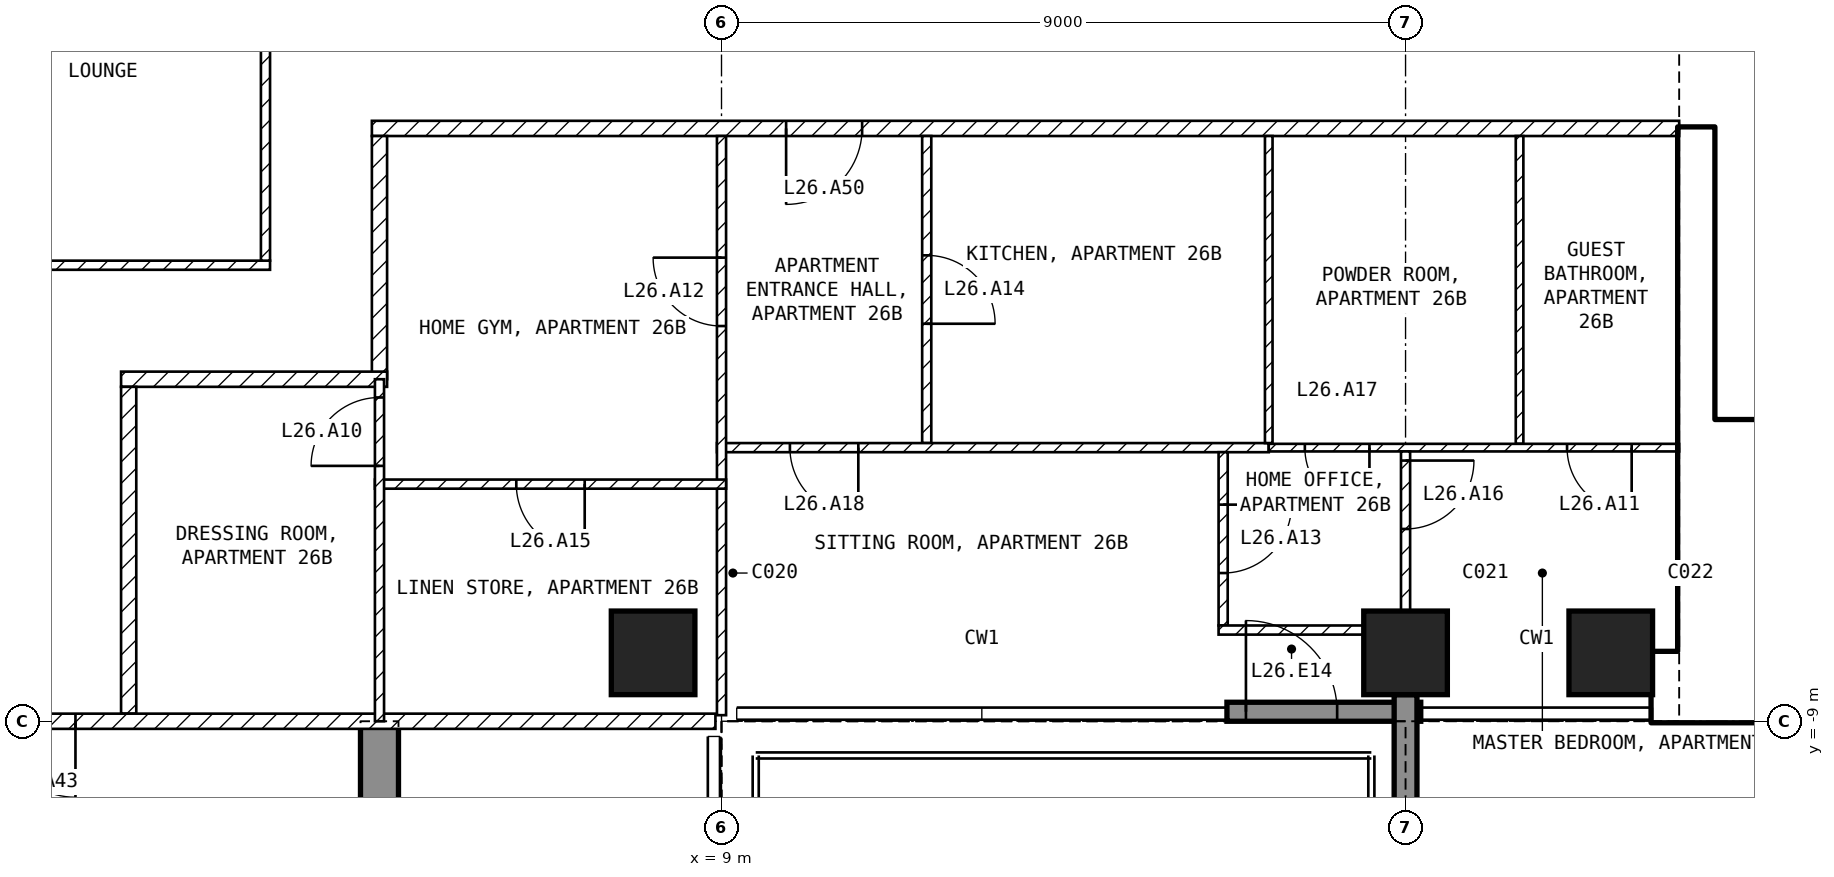
"""IFC4 building model, lengths in metres.
Left out: names, types, materials, properties, quantities, classifications, styles, units other than length and angle.
Written with IfcOpenShell. Run it as: python <this file> out.ifc"""

import sys

from ifc_helpers import new_model, si_unit, direction, frame, frame_2d, origin, origin_2d, place, context, subcontext, project, spatial, polyline, rectangle, outline, extrude, element, fill, save


model = new_model("IFC4")
c1 = context("Model", 3, precision=1e-05, world=origin(), true_north=direction((0.0, 1.0)))
c2 = subcontext(c1, "Body", "Model", "MODEL_VIEW")
j1 = project(units=[si_unit("LENGTHUNIT", "METRE"), si_unit("PLANEANGLEUNIT", "RADIAN")], contexts=[c1])
p1 = place(None, origin())
s1 = spatial("IfcSite", under=j1, at=p1, CompositionType="ELEMENT")
p2 = place(p1, origin())
s2 = spatial("IfcBuilding", under=s1, at=p2, CompositionType="ELEMENT")
p3 = place(p2, frame((0.0, 0.0, 112.9)))
s3 = spatial("IfcBuildingStorey", under=s2, at=p3, CompositionType="ELEMENT", Elevation=112.9)
for number, where, z_axis, x_axis in (
    (1, (8.1, -8.1, -0.25), (0.0, 0.0, 1.0), (1.0, 0.0, 0.0)),
    (2, (18.0, -8.1, -0.25), (0.0, 0.0, 1.0), (1.0, 0.0, 0.0)),
    (3, (20.7, -8.1, -0.25), (0.0, 0.0, 1.0), (1.0, 0.0, 0.0)),
):
    element("IfcColumn", number, at=place(p3, frame(where, z_axis=z_axis, x_axis=x_axis)), inside=s3, PredefinedType="COLUMN", context=c2, shape_type="SweptSolid", body=[
        extrude(rectangle(XDim=1.1, YDim=1.1, at=origin_2d()), origin(), (0.0, 0.0, 1.0), 3.5),
    ])
p4 = place(p3, frame((4.25, -20.15, -0.25), z_axis=(1.0, 0.0, 0.0), x_axis=(0.0, 1.0, 0.0)))
e4 = element("IfcWall", 4, at=p4, inside=s3, PredefinedType="SHEAR", context=c2, shape_type="SweptSolid", body=[
    extrude(outline(polyline([(0.0, 0.0), (6.65, 0.0), (6.65, 2.65), (9.05, 2.65), (9.05, 0.0), (11.15, 0.0), (11.15, 3.5), (0.0, 3.5), (0.0, 0.0)])), origin(), (0.0, 0.0, 1.0), 0.5),
])
p5 = place(p3, frame((15.65, -8.875, 0.0), z_axis=(0.0, 0.0, 1.0), x_axis=(1.0, 0.0, 0.0)))
e5 = element("IfcWall", 5, at=p5, inside=s3, PredefinedType="SOLIDWALL", context=c2, shape_type="SweptSolid", body=[
    extrude(rectangle(XDim=2.55, YDim=0.25, at=frame_2d((1.275, 0.0))), origin(), (0.0, 0.0, 1.0), 3.25),
])
p6 = place(p5, frame((0.25, 0.0, 0.0)))
e6 = element("IfcOpeningElement", 6, at=p6, cuts=e5, PredefinedType="OPENING", context=c2, shape_type="SweptSolid", body=[
    extrude(rectangle(XDim=1.2, YDim=2.4, at=frame_2d((0.6, 1.2))), frame((0.0, 0.135, 0.0), z_axis=(0.0, -1.0, 0.0), x_axis=(1.0, 0.0, 0.0)), (0.0, 0.0, 1.0), 0.27),
])
p7 = place(p3, frame((18.0, -8.65, 0.0), z_axis=(0.0, 0.0, 1.0), x_axis=(0.0, -1.0, 0.0)))
e7 = element("IfcWall", 7, at=p7, inside=s3, PredefinedType="SOLIDWALL", context=c2, shape_type="SweptSolid", body=[
    extrude(rectangle(XDim=3.09, YDim=0.3, at=frame_2d((1.545, 0.0))), origin(), (0.0, 0.0, 1.0), 3.25),
])
p8 = place(p3, frame((21.25, -8.55, 0.0), z_axis=(0.0, 0.0, 1.0), x_axis=(1.0, 0.0, 0.0)))
e8 = element("IfcWall", 8, at=p8, inside=s3, PredefinedType="SHEAR", context=c2, shape_type="SweptSolid", body=[
    extrude(rectangle(XDim=8.95, YDim=0.9, at=frame_2d((4.475, 0.0))), origin(), (0.0, 0.0, 1.0), 3.25),
])
p9 = place(p3, frame((21.825, -8.1, 0.0), z_axis=(0.0, 0.0, 1.0), x_axis=(0.0, 1.0, 0.0)))
e9 = element("IfcWall", 9, at=p9, inside=s3, PredefinedType="SHEAR", context=c2, shape_type="SweptSolid", body=[
    extrude(rectangle(XDim=6.9, YDim=0.45, at=frame_2d((3.45, 0.0))), origin(), (0.0, 0.0, 1.0), 3.25),
])
p10 = place(p3, frame((22.05, -5.15, 0.0), z_axis=(0.0, 0.0, 1.0), x_axis=(1.0, 0.0, 0.0)))
e10 = element("IfcWall", 10, at=p10, inside=s3, PredefinedType="SOLIDWALL", context=c2, shape_type="SweptSolid", body=[
    extrude(rectangle(XDim=6.3, YDim=0.2, at=frame_2d((3.15, 0.0))), origin(), (0.0, 0.0, 1.0), 3.25),
])
p11 = place(p10, frame((0.2, 0.0, 0.0)))
e11 = element("IfcOpeningElement", 11, at=p11, cuts=e10, PredefinedType="OPENING", context=c2, shape_type="SweptSolid", body=[
    extrude(rectangle(XDim=1.0, YDim=2.1, at=frame_2d((0.5, 1.05))), frame((0.0, 0.11, 0.0), z_axis=(0.0, -1.0, 0.0), x_axis=(1.0, 0.0, 0.0)), (0.0, 0.0, 1.0), 0.22),
])
p12 = place(p3, frame((-3.06, -3.0, 0.0), z_axis=(0.0, 0.0, 1.0), x_axis=(1.0, 0.0, 0.0)))
e12 = element("IfcWall", 12, at=p12, inside=s3, PredefinedType="PARTITIONING", context=c2, shape_type="SweptSolid", body=[
    extrude(rectangle(XDim=6.12, YDim=0.12, at=frame_2d((3.06, 0.0))), origin(), (0.0, 0.0, 1.0), 3.25),
])
p13 = place(p3, frame((3.0, -2.94, 0.0), z_axis=(0.0, 0.0, 1.0), x_axis=(0.0, 1.0, 0.0)))
e13 = element("IfcWall", 13, at=p13, inside=s3, PredefinedType="PARTITIONING", context=c2, shape_type="SweptSolid", body=[
    extrude(rectangle(XDim=5.88, YDim=0.12, at=frame_2d((2.94, 0.0))), origin(), (0.0, 0.0, 1.0), 3.25),
])
p14 = place(p3, frame((21.6, -1.2, 0.0), z_axis=(0.0, 0.0, 1.0), x_axis=(-1.0, 0.0, 0.0)))
e14 = element("IfcWall", 14, at=p14, inside=s3, PredefinedType="PARTITIONING", context=c2, shape_type="SweptSolid", body=[
    extrude(rectangle(XDim=17.2, YDim=0.2, at=frame_2d((8.6, 0.0))), origin(), (0.0, 0.0, 1.0), 3.25),
])
p15 = place(p14, frame((10.75, 0.0, 0.0)))
e15 = element("IfcOpeningElement", 15, at=p15, cuts=e14, PredefinedType="OPENING", context=c2, shape_type="SweptSolid", body=[
    extrude(rectangle(XDim=1.0, YDim=2.1, at=frame_2d((0.5, 1.05))), frame((0.0, 0.11, 0.0), z_axis=(0.0, -1.0, 0.0), x_axis=(1.0, 0.0, 0.0)), (0.0, 0.0, 1.0), 0.22),
])
p16 = place(p3, frame((4.5, -1.3, 0.0), z_axis=(0.0, 0.0, 1.0), x_axis=(0.0, -1.0, 0.0)))
e16 = element("IfcWall", 16, at=p16, inside=s3, PredefinedType="PARTITIONING", context=c2, shape_type="SweptSolid", body=[
    extrude(rectangle(XDim=3.2, YDim=0.2, at=frame_2d((1.6, 0.0))), origin(), (0.0, 0.0, 1.0), 3.25),
])
p17 = place(p3, frame((4.6, -4.5, 0.0), z_axis=(0.0, 0.0, 1.0), x_axis=(-1.0, 0.0, 0.0)))
e17 = element("IfcWall", 17, at=p17, inside=s3, PredefinedType="PARTITIONING", context=c2, shape_type="SweptSolid", body=[
    extrude(rectangle(XDim=3.5, YDim=0.2, at=frame_2d((1.75, 0.0))), origin(), (0.0, 0.0, 1.0), 3.25),
])
p18 = place(p3, frame((1.2, -4.6, 0.0), z_axis=(0.0, 0.0, 1.0), x_axis=(0.0, -1.0, 0.0)))
e18 = element("IfcWall", 18, at=p18, inside=s3, PredefinedType="PARTITIONING", context=c2, shape_type="SweptSolid", body=[
    extrude(rectangle(XDim=4.3, YDim=0.2, at=frame_2d((2.15, 0.0))), origin(), (0.0, 0.0, 1.0), 3.25),
])
p19 = place(p3, frame((8.92, -9.0, 0.0), z_axis=(0.0, 0.0, 1.0), x_axis=(-1.0, 0.0, 0.0)))
e19 = element("IfcWall", 19, at=p19, inside=s3, PredefinedType="PARTITIONING", context=c2, shape_type="SweptSolid", body=[
    extrude(rectangle(XDim=17.84, YDim=0.2, at=frame_2d((8.92, 0.0))), origin(), (0.0, 0.0, 1.0), 3.25),
])
p20 = place(p19, frame((8.42, 0.0, 0.0)))
e20 = element("IfcOpeningElement", 20, at=p20, cuts=e19, PredefinedType="OPENING", context=c2, shape_type="SweptSolid", body=[
    extrude(rectangle(XDim=1.0, YDim=2.1, at=frame_2d((0.5, 1.05))), frame((0.0, 0.11, 0.0), z_axis=(0.0, -1.0, 0.0), x_axis=(1.0, 0.0, 0.0)), (0.0, 0.0, 1.0), 0.22),
])
p21 = place(p3, frame((11.7, -1.3, 0.0), z_axis=(0.0, 0.0, 1.0), x_axis=(0.0, -1.0, 0.0)))
e21 = element("IfcWall", 21, at=p21, inside=s3, PredefinedType="PARTITIONING", context=c2, shape_type="SweptSolid", body=[
    extrude(rectangle(XDim=4.04, YDim=0.12, at=frame_2d((2.02, 0.0))), origin(), (0.0, 0.0, 1.0), 3.25),
])
p22 = place(p21, frame((1.57, 0.0, 0.0)))
e22 = element("IfcOpeningElement", 22, at=p22, cuts=e21, PredefinedType="OPENING", context=c2, shape_type="SweptSolid", body=[
    extrude(rectangle(XDim=0.9, YDim=2.1, at=frame_2d((0.45, 1.05))), frame((0.0, 0.07, 0.0), z_axis=(0.0, -1.0, 0.0), x_axis=(1.0, 0.0, 0.0)), (0.0, 0.0, 1.0), 0.14),
])
p23 = place(p3, frame((16.2, -5.4, 0.0), z_axis=(0.0, 0.0, 1.0), x_axis=(-1.0, 0.0, 0.0)))
e23 = element("IfcWall", 23, at=p23, inside=s3, PredefinedType="PARTITIONING", context=c2, shape_type="SweptSolid", body=[
    extrude(rectangle(XDim=7.26, YDim=0.12, at=frame_2d((3.63, 0.0))), origin(), (0.0, 0.0, 1.0), 3.25),
])
p24 = place(p23, frame((5.4, 0.0, 0.0)))
e24 = element("IfcOpeningElement", 24, at=p24, cuts=e23, PredefinedType="OPENING", context=c2, shape_type="SweptSolid", body=[
    extrude(rectangle(XDim=0.9, YDim=2.1, at=frame_2d((0.45, 1.05))), frame((0.0, 0.07, 0.0), z_axis=(0.0, -1.0, 0.0), x_axis=(1.0, 0.0, 0.0)), (0.0, 0.0, 1.0), 0.14),
])
p25 = place(p3, frame((9.0, -8.92, 0.0), z_axis=(0.0, 0.0, 1.0), x_axis=(0.0, 1.0, 0.0)))
e25 = element("IfcWall", 25, at=p25, inside=s3, PredefinedType="PARTITIONING", context=c2, shape_type="SweptSolid", body=[
    extrude(rectangle(XDim=7.62, YDim=0.12, at=frame_2d((3.81, 0.0))), origin(), (0.0, 0.0, 1.0), 3.25),
])
p26 = place(p25, frame((5.12, 0.0, 0.0)))
e26 = element("IfcOpeningElement", 26, at=p26, cuts=e25, PredefinedType="OPENING", context=c2, shape_type="SweptSolid", body=[
    extrude(rectangle(XDim=0.9, YDim=2.1, at=frame_2d((0.45, 1.05))), frame((0.0, 0.07, 0.0), z_axis=(0.0, -1.0, 0.0), x_axis=(1.0, 0.0, 0.0)), (0.0, 0.0, 1.0), 0.14),
])
p27 = place(p3, frame((16.2, -1.3, 0.0), z_axis=(0.0, 0.0, 1.0), x_axis=(0.0, -1.0, 0.0)))
e27 = element("IfcWall", 27, at=p27, inside=s3, PredefinedType="PARTITIONING", context=c2, shape_type="SweptSolid", body=[
    extrude(rectangle(XDim=4.04, YDim=0.1, at=frame_2d((2.02, 0.0))), origin(), (0.0, 0.0, 1.0), 3.25),
])
p28 = place(p3, frame((19.5, -1.3, 0.0), z_axis=(0.0, 0.0, 1.0), x_axis=(0.0, -1.0, 0.0)))
e28 = element("IfcWall", 28, at=p28, inside=s3, PredefinedType="PARTITIONING", context=c2, shape_type="SweptSolid", body=[
    extrude(rectangle(XDim=4.05, YDim=0.1, at=frame_2d((2.025, 0.0))), origin(), (0.0, 0.0, 1.0), 3.25),
])
p29 = place(p3, frame((21.6, -5.4, 0.0), z_axis=(0.0, 0.0, 1.0), x_axis=(-1.0, 0.0, 0.0)))
e29 = element("IfcWall", 29, at=p29, inside=s3, PredefinedType="PARTITIONING", context=c2, shape_type="SweptSolid", body=[
    extrude(rectangle(XDim=5.4, YDim=0.1, at=frame_2d((2.7, 0.0))), origin(), (0.0, 0.0, 1.0), 3.25),
])
p30 = place(p29, frame((0.625, 0.0, 0.0)))
e30 = element("IfcOpeningElement", 30, at=p30, cuts=e29, PredefinedType="OPENING", context=c2, shape_type="SweptSolid", body=[
    extrude(rectangle(XDim=0.85, YDim=2.1, at=frame_2d((0.425, 1.05))), frame((0.0, 0.06, 0.0), z_axis=(0.0, -1.0, 0.0), x_axis=(1.0, 0.0, 0.0)), (0.0, 0.0, 1.0), 0.12),
])
p31 = place(p29, frame((4.075, 0.0, 0.0)))
e31 = element("IfcOpeningElement", 31, at=p31, cuts=e29, PredefinedType="OPENING", context=c2, shape_type="SweptSolid", body=[
    extrude(rectangle(XDim=0.85, YDim=2.1, at=frame_2d((0.425, 1.05))), frame((0.0, 0.06, 0.0), z_axis=(0.0, -1.0, 0.0), x_axis=(1.0, 0.0, 0.0)), (0.0, 0.0, 1.0), 0.12),
])
p32 = place(p3, frame((15.6, -5.46, 0.0), z_axis=(0.0, 0.0, 1.0), x_axis=(0.0, -1.0, 0.0)))
e32 = element("IfcWall", 32, at=p32, inside=s3, PredefinedType="PARTITIONING", context=c2, shape_type="SweptSolid", body=[
    extrude(rectangle(XDim=2.28, YDim=0.12, at=frame_2d((1.14, 0.0))), origin(), (0.0, 0.0, 1.0), 3.25),
])
p33 = place(p32, frame((0.69, 0.0, 0.0)))
e33 = element("IfcOpeningElement", 33, at=p33, cuts=e32, PredefinedType="OPENING", context=c2, shape_type="SweptSolid", body=[
    extrude(rectangle(XDim=0.9, YDim=2.1, at=frame_2d((0.45, 1.05))), frame((0.0, 0.07, 0.0), z_axis=(0.0, -1.0, 0.0), x_axis=(1.0, 0.0, 0.0)), (0.0, 0.0, 1.0), 0.14),
])
p34 = place(p3, frame((15.54, -7.8, 0.0), z_axis=(0.0, 0.0, 1.0), x_axis=(1.0, 0.0, 0.0)))
e34 = element("IfcWall", 34, at=p34, inside=s3, PredefinedType="PARTITIONING", context=c2, shape_type="SweptSolid", body=[
    extrude(rectangle(XDim=1.91, YDim=0.12, at=frame_2d((0.955, 0.0))), origin(), (0.0, 0.0, 1.0), 3.25),
])
p35 = place(p3, frame((18.0, -5.45, 0.0), z_axis=(0.0, 0.0, 1.0), x_axis=(0.0, -1.0, 0.0)))
e35 = element("IfcWall", 35, at=p35, inside=s3, PredefinedType="PARTITIONING", context=c2, shape_type="SweptSolid", body=[
    extrude(rectangle(XDim=2.1, YDim=0.12, at=frame_2d((1.05, 0.0))), origin(), (0.0, 0.0, 1.0), 2.414),
])
p36 = place(p35, frame((0.12, 0.0, 0.0)))
e36 = element("IfcOpeningElement", 36, at=p36, cuts=e35, PredefinedType="OPENING", context=c2, shape_type="SweptSolid", body=[
    extrude(rectangle(XDim=0.9, YDim=2.1, at=frame_2d((0.45, 1.05))), frame((0.0, 0.07, 0.0), z_axis=(0.0, -1.0, 0.0), x_axis=(1.0, 0.0, 0.0)), (0.0, 0.0, 1.0), 0.14),
])
p37 = place(p3, frame((9.06, -5.88, 0.0), z_axis=(0.0, 0.0, 1.0), x_axis=(-1.0, 0.0, 0.0)))
e37 = element("IfcWall", 37, at=p37, inside=s3, PredefinedType="PARTITIONING", context=c2, shape_type="SweptSolid", body=[
    extrude(rectangle(XDim=4.62, YDim=0.12, at=frame_2d((2.31, 0.0))), origin(), (0.0, 0.0, 1.0), 3.25),
])
p38 = place(p37, frame((1.86, 0.0, 0.0)))
e38 = element("IfcOpeningElement", 38, at=p38, cuts=e37, PredefinedType="OPENING", context=c2, shape_type="SweptSolid", body=[
    extrude(rectangle(XDim=0.9, YDim=2.1, at=frame_2d((0.45, 1.05))), frame((0.0, 0.07, 0.0), z_axis=(0.0, -1.0, 0.0), x_axis=(1.0, 0.0, 0.0)), (0.0, 0.0, 1.0), 0.14),
])
p39 = place(p3, frame((4.5, -9.0, 0.0), z_axis=(0.0, 0.0, 1.0), x_axis=(0.0, 1.0, 0.0)))
e39 = element("IfcWall", 39, at=p39, inside=s3, PredefinedType="PARTITIONING", context=c2, shape_type="SweptSolid", body=[
    extrude(rectangle(XDim=4.5, YDim=0.12, at=frame_2d((2.25, 0.0))), origin(), (0.0, 0.0, 1.0), 3.25),
])
p40 = place(p39, frame((3.36, 0.0, 0.0)))
e40 = element("IfcOpeningElement", 40, at=p40, cuts=e39, PredefinedType="OPENING", context=c2, shape_type="SweptSolid", body=[
    extrude(rectangle(XDim=0.9, YDim=2.1, at=frame_2d((0.45, 1.05))), frame((0.0, 0.07, 0.0), z_axis=(0.0, -1.0, 0.0), x_axis=(1.0, 0.0, 0.0)), (0.0, 0.0, 1.0), 0.14),
])
p41 = place(p6, origin())
e41 = element("IfcDoor", 41, at=p41, inside=s3, OperationType="SINGLE_SWING_LEFT", PredefinedType="DOOR", context=c2, shape_type="SweptSolid", body=[
    extrude(rectangle(XDim=1.2, YDim=2.4, at=frame_2d((0.6, 1.2))), frame((0.0, 0.025, 0.0), z_axis=(0.0, -1.0, 0.0), x_axis=(1.0, 0.0, 0.0)), (0.0, 0.0, 1.0), 0.05),
])
fill(e6, e41)
p42 = place(p11, origin())
e42 = element("IfcDoor", 42, at=p42, inside=s3, OperationType="SINGLE_SWING_LEFT", PredefinedType="DOOR", context=c2, shape_type="SweptSolid", body=[
    extrude(rectangle(XDim=1.0, YDim=2.1, at=frame_2d((0.5, 1.05))), frame((0.0, 0.025, 0.0), z_axis=(0.0, -1.0, 0.0), x_axis=(1.0, 0.0, 0.0)), (0.0, 0.0, 1.0), 0.05),
])
fill(e11, e42)
p43 = place(p40, origin())
e43 = element("IfcDoor", 43, at=p43, inside=s3, OperationType="SINGLE_SWING_LEFT", PredefinedType="DOOR", context=c2, shape_type="SweptSolid", body=[
    extrude(rectangle(XDim=0.9, YDim=2.1, at=frame_2d((0.45, 1.05))), frame((0.0, 0.025, 0.0), z_axis=(0.0, -1.0, 0.0), x_axis=(1.0, 0.0, 0.0)), (0.0, 0.0, 1.0), 0.05),
])
fill(e40, e43)
p44 = place(p30, origin())
e44 = element("IfcDoor", 44, at=p44, inside=s3, OperationType="SINGLE_SWING_LEFT", PredefinedType="DOOR", context=c2, shape_type="SweptSolid", body=[
    extrude(rectangle(XDim=0.85, YDim=2.1, at=frame_2d((0.425, 1.05))), frame((0.0, 0.025, 0.0), z_axis=(0.0, -1.0, 0.0), x_axis=(1.0, 0.0, 0.0)), (0.0, 0.0, 1.0), 0.05),
])
fill(e30, e44)
p45 = place(p26, origin())
e45 = element("IfcDoor", 45, at=p45, inside=s3, OperationType="SINGLE_SWING_RIGHT", PredefinedType="DOOR", context=c2, shape_type="SweptSolid", body=[
    extrude(rectangle(XDim=0.9, YDim=2.1, at=frame_2d((0.45, 1.05))), frame((0.0, 0.025, 0.0), z_axis=(0.0, -1.0, 0.0), x_axis=(1.0, 0.0, 0.0)), (0.0, 0.0, 1.0), 0.05),
])
fill(e26, e45)
p46 = place(p33, origin())
e46 = element("IfcDoor", 46, at=p46, inside=s3, OperationType="SINGLE_SWING_LEFT", PredefinedType="DOOR", context=c2, shape_type="SweptSolid", body=[
    extrude(rectangle(XDim=0.9, YDim=2.1, at=frame_2d((0.45, 1.05))), frame((0.0, 0.025, 0.0), z_axis=(0.0, -1.0, 0.0), x_axis=(1.0, 0.0, 0.0)), (0.0, 0.0, 1.0), 0.05),
])
fill(e33, e46)
p47 = place(p22, origin())
e47 = element("IfcDoor", 47, at=p47, inside=s3, OperationType="SINGLE_SWING_RIGHT", PredefinedType="DOOR", context=c2, shape_type="SweptSolid", body=[
    extrude(rectangle(XDim=0.9, YDim=2.1, at=frame_2d((0.45, 1.05))), frame((0.0, 0.025, 0.0), z_axis=(0.0, -1.0, 0.0), x_axis=(1.0, 0.0, 0.0)), (0.0, 0.0, 1.0), 0.05),
])
fill(e22, e47)
p48 = place(p38, origin())
e48 = element("IfcDoor", 48, at=p48, inside=s3, OperationType="SINGLE_SWING_LEFT", PredefinedType="DOOR", context=c2, shape_type="SweptSolid", body=[
    extrude(rectangle(XDim=0.9, YDim=2.1, at=frame_2d((0.45, 1.05))), frame((0.0, 0.025, 0.0), z_axis=(0.0, -1.0, 0.0), x_axis=(1.0, 0.0, 0.0)), (0.0, 0.0, 1.0), 0.05),
])
fill(e38, e48)
p49 = place(p36, origin())
e49 = element("IfcDoor", 49, at=p49, inside=s3, OperationType="SINGLE_SWING_LEFT", PredefinedType="DOOR", context=c2, shape_type="SweptSolid", body=[
    extrude(rectangle(XDim=0.9, YDim=2.1, at=frame_2d((0.45, 1.05))), frame((0.0, 0.025, 0.0), z_axis=(0.0, -1.0, 0.0), x_axis=(1.0, 0.0, 0.0)), (0.0, 0.0, 1.0), 0.05),
])
fill(e36, e49)
p50 = place(p31, origin())
e50 = element("IfcDoor", 50, at=p50, inside=s3, OperationType="SINGLE_SWING_LEFT", PredefinedType="DOOR", context=c2, shape_type="SweptSolid", body=[
    extrude(rectangle(XDim=0.85, YDim=2.1, at=frame_2d((0.425, 1.05))), frame((0.0, 0.025, 0.0), z_axis=(0.0, -1.0, 0.0), x_axis=(1.0, 0.0, 0.0)), (0.0, 0.0, 1.0), 0.05),
])
fill(e31, e50)
p51 = place(p24, origin())
e51 = element("IfcDoor", 51, at=p51, inside=s3, OperationType="SINGLE_SWING_LEFT", PredefinedType="DOOR", context=c2, shape_type="SweptSolid", body=[
    extrude(rectangle(XDim=0.9, YDim=2.1, at=frame_2d((0.45, 1.05))), frame((0.0, 0.025, 0.0), z_axis=(0.0, -1.0, 0.0), x_axis=(1.0, 0.0, 0.0)), (0.0, 0.0, 1.0), 0.05),
])
fill(e24, e51)
p52 = place(p20, origin())
e52 = element("IfcDoor", 52, at=p52, inside=s3, OperationType="SINGLE_SWING_LEFT", PredefinedType="DOOR", context=c2, shape_type="SweptSolid", body=[
    extrude(rectangle(XDim=1.0, YDim=2.1, at=frame_2d((0.5, 1.05))), frame((0.0, 0.025, 0.0), z_axis=(0.0, -1.0, 0.0), x_axis=(1.0, 0.0, 0.0)), (0.0, 0.0, 1.0), 0.05),
])
fill(e20, e52)
p53 = place(p15, origin())
e53 = element("IfcDoor", 53, at=p53, inside=s3, OperationType="SINGLE_SWING_RIGHT", PredefinedType="DOOR", context=c2, shape_type="SweptSolid", body=[
    extrude(rectangle(XDim=1.0, YDim=2.1, at=frame_2d((0.5, 1.05))), frame((0.0, 0.025, 0.0), z_axis=(0.0, -1.0, 0.0), x_axis=(1.0, 0.0, 0.0)), (0.0, 0.0, 1.0), 0.05),
])
fill(e15, e53)
save(model, sys.argv[1])
